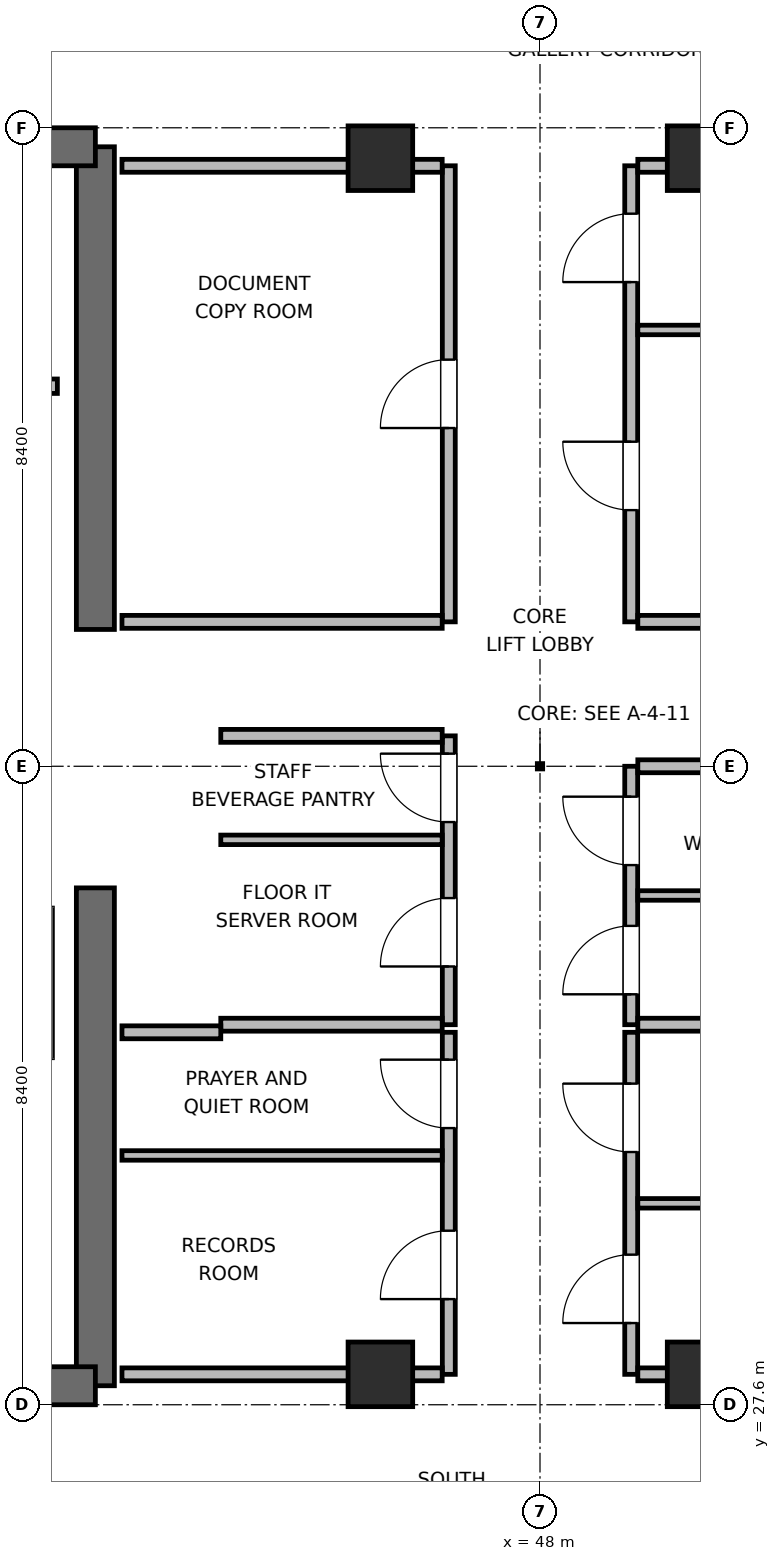
"""IFC4 building model, lengths in metres.
Left out: names, types, materials, properties, quantities, classifications, styles, units other than length and angle.
Written with IfcOpenShell. Run it as: python <this file> out.ifc"""

import sys

from ifc_helpers import new_model, si_unit, direction, frame, frame_2d, origin, origin_2d, place, context, subcontext, project, spatial, rectangle, extrude, element, fill, save


model = new_model("IFC4")
c1 = context("Model", 3, precision=1e-05, world=origin(), true_north=direction((0.0, 1.0)))
c2 = subcontext(c1, "Body", "Model", "MODEL_VIEW")
j1 = project(units=[si_unit("LENGTHUNIT", "METRE"), si_unit("PLANEANGLEUNIT", "RADIAN")], contexts=[c1])
p1 = place(None, origin())
s1 = spatial("IfcSite", under=j1, at=p1, CompositionType="ELEMENT")
p2 = place(p1, origin())
s2 = spatial("IfcBuilding", under=s1, at=p2, CompositionType="ELEMENT")
p3 = place(p2, frame((0.0, 0.0, 337.5)))
s3 = spatial("IfcBuildingStorey", under=s2, at=p3, CompositionType="ELEMENT", Elevation=337.5)
p4 = place(p3, frame((42.15, 27.85, 0.0), z_axis=(0.0, 0.0, 1.0), x_axis=(0.0, 1.0, 0.0)))
e1 = element("IfcWall", 1, at=p4, inside=s3, PredefinedType="SHEAR", context=c2, shape_type="SweptSolid", body=[
    extrude(rectangle(XDim=6.55, YDim=0.5, at=frame_2d((3.275, 0.0))), origin(), (0.0, 0.0, 1.0), 4.5),
])
p5 = place(p3, frame((42.15, 37.8, 0.0), z_axis=(0.0, 0.0, 1.0), x_axis=(0.0, 1.0, 0.0)))
e2 = element("IfcWall", 2, at=p5, inside=s3, PredefinedType="SHEAR", context=c2, shape_type="SweptSolid", body=[
    extrude(rectangle(XDim=6.35, YDim=0.5, at=frame_2d((3.175, 0.0))), origin(), (0.0, 0.0, 1.0), 4.5),
])
p6 = place(p3, frame((32.65, 27.85, 0.0), z_axis=(0.0, 0.0, 1.0), x_axis=(1.0, 0.0, 0.0)))
e3 = element("IfcWall", 3, at=p6, inside=s3, PredefinedType="SHEAR", context=c2, shape_type="SweptSolid", body=[
    extrude(rectangle(XDim=9.5, YDim=0.5, at=frame_2d((4.75, 0.0))), origin(), (0.0, 0.0, 1.0), 4.5),
])
p7 = place(p6, frame((5.075, 0.0, 0.0)))
e4 = element("IfcOpeningElement", 4, at=p7, cuts=e3, PredefinedType="OPENING", context=c2, shape_type="SweptSolid", body=[
    extrude(rectangle(XDim=1.05, YDim=2.04, at=frame_2d((0.525, 1.02))), frame((0.0, 0.26, 0.0), z_axis=(0.0, -1.0, 0.0), x_axis=(1.0, 0.0, 0.0)), (0.0, 0.0, 1.0), 0.52),
])
p8 = place(p3, frame((32.65, 44.15, 0.0), z_axis=(0.0, 0.0, 1.0), x_axis=(1.0, 0.0, 0.0)))
e5 = element("IfcWall", 5, at=p8, inside=s3, PredefinedType="SHEAR", context=c2, shape_type="SweptSolid", body=[
    extrude(rectangle(XDim=9.5, YDim=0.5, at=frame_2d((4.75, 0.0))), origin(), (0.0, 0.0, 1.0), 4.5),
])
p9 = place(p8, frame((1.075, 0.0, 0.0)))
e6 = element("IfcOpeningElement", 6, at=p9, cuts=e5, PredefinedType="OPENING", context=c2, shape_type="SweptSolid", body=[
    extrude(rectangle(XDim=0.95, YDim=2.04, at=frame_2d((0.475, 1.02))), frame((0.0, 0.26, 0.0), z_axis=(0.0, -1.0, 0.0), x_axis=(1.0, 0.0, 0.0)), (0.0, 0.0, 1.0), 0.52),
])
p10 = place(p8, frame((4.325, 0.0, 0.0)))
e7 = element("IfcOpeningElement", 7, at=p10, cuts=e5, PredefinedType="OPENING", context=c2, shape_type="SweptSolid", body=[
    extrude(rectangle(XDim=0.9, YDim=2.02, at=frame_2d((0.45, 1.01))), frame((0.0, 0.26, 0.0), z_axis=(0.0, -1.0, 0.0), x_axis=(1.0, 0.0, 0.0)), (0.0, 0.0, 1.0), 0.52),
])
p11 = place(p8, frame((7.225, 0.0, 0.0)))
e8 = element("IfcOpeningElement", 8, at=p11, cuts=e5, PredefinedType="OPENING", context=c2, shape_type="SweptSolid", body=[
    extrude(rectangle(XDim=0.9, YDim=2.02, at=frame_2d((0.45, 1.01))), frame((0.0, 0.26, 0.0), z_axis=(0.0, -1.0, 0.0), x_axis=(1.0, 0.0, 0.0)), (0.0, 0.0, 1.0), 0.52),
])
for number, where, z_axis, x_axis in (
    (9, (45.9, 28.0, 0.0), (0.0, 0.0, 1.0), (1.0, 0.0, 0.0)),
    (10, (50.1, 28.0, 0.0), (0.0, 0.0, 1.0), (1.0, 0.0, 0.0)),
    (11, (45.9, 44.0, 0.0), (0.0, 0.0, 1.0), (1.0, 0.0, 0.0)),
    (12, (50.1, 44.0, 0.0), (0.0, 0.0, 1.0), (1.0, 0.0, 0.0)),
):
    element("IfcColumn", number, at=place(p3, frame(where, z_axis=z_axis, x_axis=x_axis)), inside=s3, PredefinedType="COLUMN", context=c2, shape_type="SweptSolid", body=[
        extrude(rectangle(XDim=0.85, YDim=0.85, at=origin_2d()), origin(), (0.0, 0.0, 1.0), 4.5),
    ])
p12 = place(p3, frame((33.15, 41.0, 0.0), z_axis=(0.0, 0.0, 1.0), x_axis=(1.0, 0.0, 0.0)))
e13 = element("IfcWall", 13, at=p12, inside=s3, PredefinedType="PLUMBINGWALL", context=c2, shape_type="SweptSolid", body=[
    extrude(rectangle(XDim=8.5, YDim=0.19, at=frame_2d((4.25, 0.0))), origin(), (0.0, 0.0, 1.0), 4.28),
])
p13 = place(p3, frame((46.8, 32.6, 0.0), z_axis=(0.0, 0.0, 1.0), x_axis=(0.0, 1.0, 0.0)))
e14 = element("IfcWall", 14, at=p13, inside=s3, PredefinedType="PARTITIONING", context=c2, shape_type="SweptSolid", body=[
    extrude(rectangle(XDim=3.8, YDim=0.17, at=frame_2d((1.9, 0.0))), origin(), (0.0, 0.0, 1.0), 4.28),
])
p14 = place(p13, frame((0.766, 0.0, 0.0)))
e15 = element("IfcOpeningElement", 15, at=p14, cuts=e14, PredefinedType="OPENING", context=c2, shape_type="SweptSolid", body=[
    extrude(rectangle(XDim=0.9, YDim=2.02, at=frame_2d((0.45, 1.01))), frame((0.0, 0.095, 0.0), z_axis=(0.0, -1.0, 0.0), x_axis=(1.0, 0.0, 0.0)), (0.0, 0.0, 1.0), 0.19),
])
p15 = place(p13, frame((2.666, 0.0, 0.0)))
e16 = element("IfcOpeningElement", 16, at=p15, cuts=e14, PredefinedType="OPENING", context=c2, shape_type="SweptSolid", body=[
    extrude(rectangle(XDim=0.9, YDim=2.02, at=frame_2d((0.45, 1.01))), frame((0.0, 0.095, 0.0), z_axis=(0.0, -1.0, 0.0), x_axis=(1.0, 0.0, 0.0)), (0.0, 0.0, 1.0), 0.19),
])
for number, where, z_axis, x_axis in (
    (17, (43.8, 32.6, 0.0), (0.0, 0.0, 1.0), (1.0, 0.0, 0.0)),
    (18, (43.8, 36.4, 0.0), (0.0, 0.0, 1.0), (1.0, 0.0, 0.0)),
):
    element("IfcWall", number, at=place(p3, frame(where, z_axis=z_axis, x_axis=x_axis)), inside=s3, PredefinedType="PARTITIONING", context=c2, shape_type="SweptSolid", body=[
        extrude(rectangle(XDim=2.913, YDim=0.17, at=frame_2d((1.457, 0.0))), origin(), (0.0, 0.0, 1.0), 4.28),
    ])
p16 = place(p3, frame((43.8, 35.032, 0.0), z_axis=(0.0, 0.0, 1.0), x_axis=(1.0, 0.0, 0.0)))
e19 = element("IfcWall", 19, at=p16, inside=s3, PredefinedType="PARTITIONING", context=c2, shape_type="SweptSolid", body=[
    extrude(rectangle(XDim=2.913, YDim=0.125, at=frame_2d((1.457, 0.0))), origin(), (0.0, 0.0, 1.0), 4.28),
])
p17 = place(p3, frame((49.2, 32.6, 0.0), z_axis=(0.0, 0.0, 1.0), x_axis=(0.0, 1.0, 0.0)))
e20 = element("IfcWall", 20, at=p17, inside=s3, PredefinedType="PARTITIONING", context=c2, shape_type="SweptSolid", body=[
    extrude(rectangle(XDim=3.4, YDim=0.17, at=frame_2d((1.7, 0.0))), origin(), (0.0, 0.0, 1.0), 4.28),
])
p18 = place(p17, frame((0.4, 0.0, 0.0)))
e21 = element("IfcOpeningElement", 21, at=p18, cuts=e20, PredefinedType="OPENING", context=c2, shape_type="SweptSolid", body=[
    extrude(rectangle(XDim=0.9, YDim=2.02, at=frame_2d((0.45, 1.01))), frame((0.0, 0.095, 0.0), z_axis=(0.0, -1.0, 0.0), x_axis=(1.0, 0.0, 0.0)), (0.0, 0.0, 1.0), 0.19),
])
p19 = place(p17, frame((2.1, 0.0, 0.0)))
e22 = element("IfcOpeningElement", 22, at=p19, cuts=e20, PredefinedType="OPENING", context=c2, shape_type="SweptSolid", body=[
    extrude(rectangle(XDim=0.9, YDim=2.02, at=frame_2d((0.45, 1.01))), frame((0.0, 0.095, 0.0), z_axis=(0.0, -1.0, 0.0), x_axis=(1.0, 0.0, 0.0)), (0.0, 0.0, 1.0), 0.19),
])
for number, where, z_axis, x_axis in (
    (23, (49.287, 32.6, 0.0), (0.0, 0.0, 1.0), (1.0, 0.0, 0.0)),
    (24, (49.287, 36.0, 0.0), (0.0, 0.0, 1.0), (1.0, 0.0, 0.0)),
):
    element("IfcWall", number, at=place(p3, frame(where, z_axis=z_axis, x_axis=x_axis)), inside=s3, PredefinedType="PARTITIONING", context=c2, shape_type="SweptSolid", body=[
        extrude(rectangle(XDim=2.913, YDim=0.17, at=frame_2d((1.457, 0.0))), origin(), (0.0, 0.0, 1.0), 4.28),
    ])
p20 = place(p3, frame((49.287, 34.3, 0.0), z_axis=(0.0, 0.0, 1.0), x_axis=(1.0, 0.0, 0.0)))
e25 = element("IfcWall", 25, at=p20, inside=s3, PredefinedType="PARTITIONING", context=c2, shape_type="SweptSolid", body=[
    extrude(rectangle(XDim=2.913, YDim=0.125, at=frame_2d((1.457, 0.0))), origin(), (0.0, 0.0, 1.0), 4.28),
])
p21 = place(p3, frame((46.8, 28.0, 0.0), z_axis=(0.0, 0.0, 1.0), x_axis=(0.0, 1.0, 0.0)))
e26 = element("IfcWall", 26, at=p21, inside=s3, PredefinedType="PARTITIONING", context=c2, shape_type="SweptSolid", body=[
    extrude(rectangle(XDim=4.5, YDim=0.17, at=frame_2d((2.25, 0.0))), origin(), (0.0, 0.0, 1.0), 4.28),
])
p22 = place(p21, frame((0.99, 0.0, 0.0)))
e27 = element("IfcOpeningElement", 27, at=p22, cuts=e26, PredefinedType="OPENING", context=c2, shape_type="SweptSolid", body=[
    extrude(rectangle(XDim=0.9, YDim=2.02, at=frame_2d((0.45, 1.01))), frame((0.0, 0.095, 0.0), z_axis=(0.0, -1.0, 0.0), x_axis=(1.0, 0.0, 0.0)), (0.0, 0.0, 1.0), 0.19),
])
p23 = place(p21, frame((3.24, 0.0, 0.0)))
e28 = element("IfcOpeningElement", 28, at=p23, cuts=e26, PredefinedType="OPENING", context=c2, shape_type="SweptSolid", body=[
    extrude(rectangle(XDim=0.9, YDim=2.02, at=frame_2d((0.45, 1.01))), frame((0.0, 0.095, 0.0), z_axis=(0.0, -1.0, 0.0), x_axis=(1.0, 0.0, 0.0)), (0.0, 0.0, 1.0), 0.19),
])
p24 = place(p3, frame((42.5, 28.0, 0.0), z_axis=(0.0, 0.0, 1.0), x_axis=(1.0, 0.0, 0.0)))
e29 = element("IfcWall", 29, at=p24, inside=s3, PredefinedType="PARTITIONING", context=c2, shape_type="SweptSolid", body=[
    extrude(rectangle(XDim=4.213, YDim=0.17, at=frame_2d((2.106, 0.0))), origin(), (0.0, 0.0, 1.0), 3.365),
])
p25 = place(p3, frame((42.5, 32.5, 0.0), z_axis=(0.0, 0.0, 1.0), x_axis=(1.0, 0.0, 0.0)))
e30 = element("IfcWall", 30, at=p25, inside=s3, PredefinedType="PARTITIONING", context=c2, shape_type="SweptSolid", body=[
    extrude(rectangle(XDim=1.3, YDim=0.17, at=frame_2d((0.65, 0.0))), origin(), (0.0, 0.0, 1.0), 4.28),
])
p26 = place(p3, frame((42.5, 30.88, 0.0), z_axis=(0.0, 0.0, 1.0), x_axis=(1.0, 0.0, 0.0)))
e31 = element("IfcWall", 31, at=p26, inside=s3, PredefinedType="PARTITIONING", context=c2, shape_type="SweptSolid", body=[
    extrude(rectangle(XDim=4.213, YDim=0.125, at=frame_2d((2.106, 0.0))), origin(), (0.0, 0.0, 1.0), 4.28),
])
p27 = place(p3, frame((49.2, 28.0, 0.0), z_axis=(0.0, 0.0, 1.0), x_axis=(0.0, 1.0, 0.0)))
e32 = element("IfcWall", 32, at=p27, inside=s3, PredefinedType="PARTITIONING", context=c2, shape_type="SweptSolid", body=[
    extrude(rectangle(XDim=4.5, YDim=0.17, at=frame_2d((2.25, 0.0))), origin(), (0.0, 0.0, 1.0), 4.28),
])
p28 = place(p27, frame((0.675, 0.0, 0.0)))
e33 = element("IfcOpeningElement", 33, at=p28, cuts=e32, PredefinedType="OPENING", context=c2, shape_type="SweptSolid", body=[
    extrude(rectangle(XDim=0.9, YDim=2.02, at=frame_2d((0.45, 1.01))), frame((0.0, 0.095, 0.0), z_axis=(0.0, -1.0, 0.0), x_axis=(1.0, 0.0, 0.0)), (0.0, 0.0, 1.0), 0.19),
])
p29 = place(p27, frame((2.925, 0.0, 0.0)))
e34 = element("IfcOpeningElement", 34, at=p29, cuts=e32, PredefinedType="OPENING", context=c2, shape_type="SweptSolid", body=[
    extrude(rectangle(XDim=0.9, YDim=2.02, at=frame_2d((0.45, 1.01))), frame((0.0, 0.095, 0.0), z_axis=(0.0, -1.0, 0.0), x_axis=(1.0, 0.0, 0.0)), (0.0, 0.0, 1.0), 0.19),
])
p30 = place(p3, frame((49.287, 28.0, 0.0), z_axis=(0.0, 0.0, 1.0), x_axis=(1.0, 0.0, 0.0)))
e35 = element("IfcWall", 35, at=p30, inside=s3, PredefinedType="PARTITIONING", context=c2, shape_type="SweptSolid", body=[
    extrude(rectangle(XDim=4.213, YDim=0.17, at=frame_2d((2.106, 0.0))), origin(), (0.0, 0.0, 1.0), 3.365),
])
p31 = place(p3, frame((49.287, 30.25, 0.0), z_axis=(0.0, 0.0, 1.0), x_axis=(1.0, 0.0, 0.0)))
e36 = element("IfcWall", 36, at=p31, inside=s3, PredefinedType="PARTITIONING", context=c2, shape_type="SweptSolid", body=[
    extrude(rectangle(XDim=4.213, YDim=0.125, at=frame_2d((2.106, 0.0))), origin(), (0.0, 0.0, 1.0), 4.28),
])
p32 = place(p3, frame((46.8, 37.9, 0.0), z_axis=(0.0, 0.0, 1.0), x_axis=(0.0, 1.0, 0.0)))
e37 = element("IfcWall", 37, at=p32, inside=s3, PredefinedType="PARTITIONING", context=c2, shape_type="SweptSolid", body=[
    extrude(rectangle(XDim=6.0, YDim=0.17, at=frame_2d((3.0, 0.0))), origin(), (0.0, 0.0, 1.0), 4.28),
])
p33 = place(p32, frame((2.55, 0.0, 0.0)))
e38 = element("IfcOpeningElement", 38, at=p33, cuts=e37, PredefinedType="OPENING", context=c2, shape_type="SweptSolid", body=[
    extrude(rectangle(XDim=0.9, YDim=2.02, at=frame_2d((0.45, 1.01))), frame((0.0, 0.095, 0.0), z_axis=(0.0, -1.0, 0.0), x_axis=(1.0, 0.0, 0.0)), (0.0, 0.0, 1.0), 0.19),
])
p34 = place(p3, frame((42.5, 37.9, 0.0), z_axis=(0.0, 0.0, 1.0), x_axis=(1.0, 0.0, 0.0)))
e39 = element("IfcWall", 39, at=p34, inside=s3, PredefinedType="PARTITIONING", context=c2, shape_type="SweptSolid", body=[
    extrude(rectangle(XDim=4.213, YDim=0.17, at=frame_2d((2.106, 0.0))), origin(), (0.0, 0.0, 1.0), 4.28),
])
p35 = place(p3, frame((42.5, 43.9, 0.0), z_axis=(0.0, 0.0, 1.0), x_axis=(1.0, 0.0, 0.0)))
e40 = element("IfcWall", 40, at=p35, inside=s3, PredefinedType="PARTITIONING", context=c2, shape_type="SweptSolid", body=[
    extrude(rectangle(XDim=4.213, YDim=0.17, at=frame_2d((2.106, 0.0))), origin(), (0.0, 0.0, 1.0), 3.365),
])
p36 = place(p3, frame((49.2, 37.9, 0.0), z_axis=(0.0, 0.0, 1.0), x_axis=(0.0, 1.0, 0.0)))
e41 = element("IfcWall", 41, at=p36, inside=s3, PredefinedType="PARTITIONING", context=c2, shape_type="SweptSolid", body=[
    extrude(rectangle(XDim=6.0, YDim=0.17, at=frame_2d((3.0, 0.0))), origin(), (0.0, 0.0, 1.0), 4.28),
])
p37 = place(p36, frame((1.47, 0.0, 0.0)))
e42 = element("IfcOpeningElement", 42, at=p37, cuts=e41, PredefinedType="OPENING", context=c2, shape_type="SweptSolid", body=[
    extrude(rectangle(XDim=0.9, YDim=2.02, at=frame_2d((0.45, 1.01))), frame((0.0, 0.095, 0.0), z_axis=(0.0, -1.0, 0.0), x_axis=(1.0, 0.0, 0.0)), (0.0, 0.0, 1.0), 0.19),
])
p38 = place(p36, frame((4.47, 0.0, 0.0)))
e43 = element("IfcOpeningElement", 43, at=p38, cuts=e41, PredefinedType="OPENING", context=c2, shape_type="SweptSolid", body=[
    extrude(rectangle(XDim=0.9, YDim=2.02, at=frame_2d((0.45, 1.01))), frame((0.0, 0.095, 0.0), z_axis=(0.0, -1.0, 0.0), x_axis=(1.0, 0.0, 0.0)), (0.0, 0.0, 1.0), 0.19),
])
p39 = place(p3, frame((49.287, 37.9, 0.0), z_axis=(0.0, 0.0, 1.0), x_axis=(1.0, 0.0, 0.0)))
e44 = element("IfcWall", 44, at=p39, inside=s3, PredefinedType="PARTITIONING", context=c2, shape_type="SweptSolid", body=[
    extrude(rectangle(XDim=4.113, YDim=0.17, at=frame_2d((2.056, 0.0))), origin(), (0.0, 0.0, 1.0), 4.28),
])
p40 = place(p3, frame((49.287, 43.9, 0.0), z_axis=(0.0, 0.0, 1.0), x_axis=(1.0, 0.0, 0.0)))
e45 = element("IfcWall", 45, at=p40, inside=s3, PredefinedType="PARTITIONING", context=c2, shape_type="SweptSolid", body=[
    extrude(rectangle(XDim=4.113, YDim=0.17, at=frame_2d((2.056, 0.0))), origin(), (0.0, 0.0, 1.0), 3.365),
])
p41 = place(p3, frame((49.287, 41.74, 0.0), z_axis=(0.0, 0.0, 1.0), x_axis=(1.0, 0.0, 0.0)))
e46 = element("IfcWall", 46, at=p41, inside=s3, PredefinedType="PARTITIONING", context=c2, shape_type="SweptSolid", body=[
    extrude(rectangle(XDim=4.113, YDim=0.125, at=frame_2d((2.056, 0.0))), origin(), (0.0, 0.0, 1.0), 4.28),
])
p42 = place(p14, origin())
e47 = element("IfcDoor", 47, at=p42, inside=s3, OperationType="SINGLE_SWING_LEFT", PredefinedType="DOOR", context=c2, shape_type="SweptSolid", body=[
    extrude(rectangle(XDim=0.9, YDim=2.02, at=frame_2d((0.45, 1.01))), frame((0.0, 0.025, 0.0), z_axis=(0.0, -1.0, 0.0), x_axis=(1.0, 0.0, 0.0)), (0.0, 0.0, 1.0), 0.05),
])
fill(e15, e47)
p43 = place(p15, origin())
e48 = element("IfcDoor", 48, at=p43, inside=s3, OperationType="SINGLE_SWING_RIGHT", PredefinedType="DOOR", context=c2, shape_type="SweptSolid", body=[
    extrude(rectangle(XDim=0.9, YDim=2.02, at=frame_2d((0.45, 1.01))), frame((0.0, 0.025, 0.0), z_axis=(0.0, -1.0, 0.0), x_axis=(1.0, 0.0, 0.0)), (0.0, 0.0, 1.0), 0.05),
])
fill(e16, e48)
p44 = place(p18, origin())
e49 = element("IfcDoor", 49, at=p44, inside=s3, OperationType="SINGLE_SWING_LEFT", PredefinedType="DOOR", context=c2, shape_type="SweptSolid", body=[
    extrude(rectangle(XDim=0.9, YDim=2.02, at=frame_2d((0.45, 1.01))), frame((0.0, 0.025, 0.0), z_axis=(0.0, -1.0, 0.0), x_axis=(1.0, 0.0, 0.0)), (0.0, 0.0, 1.0), 0.05),
])
fill(e21, e49)
p45 = place(p19, origin())
e50 = element("IfcDoor", 50, at=p45, inside=s3, OperationType="SINGLE_SWING_RIGHT", PredefinedType="DOOR", context=c2, shape_type="SweptSolid", body=[
    extrude(rectangle(XDim=0.9, YDim=2.02, at=frame_2d((0.45, 1.01))), frame((0.0, 0.025, 0.0), z_axis=(0.0, -1.0, 0.0), x_axis=(1.0, 0.0, 0.0)), (0.0, 0.0, 1.0), 0.05),
])
fill(e22, e50)
p46 = place(p22, origin())
e51 = element("IfcDoor", 51, at=p46, inside=s3, OperationType="SINGLE_SWING_LEFT", PredefinedType="DOOR", context=c2, shape_type="SweptSolid", body=[
    extrude(rectangle(XDim=0.9, YDim=2.02, at=frame_2d((0.45, 1.01))), frame((0.0, 0.025, 0.0), z_axis=(0.0, -1.0, 0.0), x_axis=(1.0, 0.0, 0.0)), (0.0, 0.0, 1.0), 0.05),
])
fill(e27, e51)
p47 = place(p23, origin())
e52 = element("IfcDoor", 52, at=p47, inside=s3, OperationType="SINGLE_SWING_RIGHT", PredefinedType="DOOR", context=c2, shape_type="SweptSolid", body=[
    extrude(rectangle(XDim=0.9, YDim=2.02, at=frame_2d((0.45, 1.01))), frame((0.0, 0.025, 0.0), z_axis=(0.0, -1.0, 0.0), x_axis=(1.0, 0.0, 0.0)), (0.0, 0.0, 1.0), 0.05),
])
fill(e28, e52)
p48 = place(p28, origin())
e53 = element("IfcDoor", 53, at=p48, inside=s3, OperationType="SINGLE_SWING_LEFT", PredefinedType="DOOR", context=c2, shape_type="SweptSolid", body=[
    extrude(rectangle(XDim=0.9, YDim=2.02, at=frame_2d((0.45, 1.01))), frame((0.0, 0.025, 0.0), z_axis=(0.0, -1.0, 0.0), x_axis=(1.0, 0.0, 0.0)), (0.0, 0.0, 1.0), 0.05),
])
fill(e33, e53)
p49 = place(p29, origin())
e54 = element("IfcDoor", 54, at=p49, inside=s3, OperationType="SINGLE_SWING_RIGHT", PredefinedType="DOOR", context=c2, shape_type="SweptSolid", body=[
    extrude(rectangle(XDim=0.9, YDim=2.02, at=frame_2d((0.45, 1.01))), frame((0.0, 0.025, 0.0), z_axis=(0.0, -1.0, 0.0), x_axis=(1.0, 0.0, 0.0)), (0.0, 0.0, 1.0), 0.05),
])
fill(e34, e54)
p50 = place(p33, origin())
e55 = element("IfcDoor", 55, at=p50, inside=s3, OperationType="SINGLE_SWING_LEFT", PredefinedType="DOOR", context=c2, shape_type="SweptSolid", body=[
    extrude(rectangle(XDim=0.9, YDim=2.02, at=frame_2d((0.45, 1.01))), frame((0.0, 0.025, 0.0), z_axis=(0.0, -1.0, 0.0), x_axis=(1.0, 0.0, 0.0)), (0.0, 0.0, 1.0), 0.05),
])
fill(e38, e55)
p51 = place(p37, origin())
e56 = element("IfcDoor", 56, at=p51, inside=s3, OperationType="SINGLE_SWING_RIGHT", PredefinedType="DOOR", context=c2, shape_type="SweptSolid", body=[
    extrude(rectangle(XDim=0.9, YDim=2.02, at=frame_2d((0.45, 1.01))), frame((0.0, 0.025, 0.0), z_axis=(0.0, -1.0, 0.0), x_axis=(1.0, 0.0, 0.0)), (0.0, 0.0, 1.0), 0.05),
])
fill(e42, e56)
p52 = place(p38, origin())
e57 = element("IfcDoor", 57, at=p52, inside=s3, OperationType="SINGLE_SWING_LEFT", PredefinedType="DOOR", context=c2, shape_type="SweptSolid", body=[
    extrude(rectangle(XDim=0.9, YDim=2.02, at=frame_2d((0.45, 1.01))), frame((0.0, 0.025, 0.0), z_axis=(0.0, -1.0, 0.0), x_axis=(1.0, 0.0, 0.0)), (0.0, 0.0, 1.0), 0.05),
])
fill(e43, e57)
save(model, sys.argv[1])
